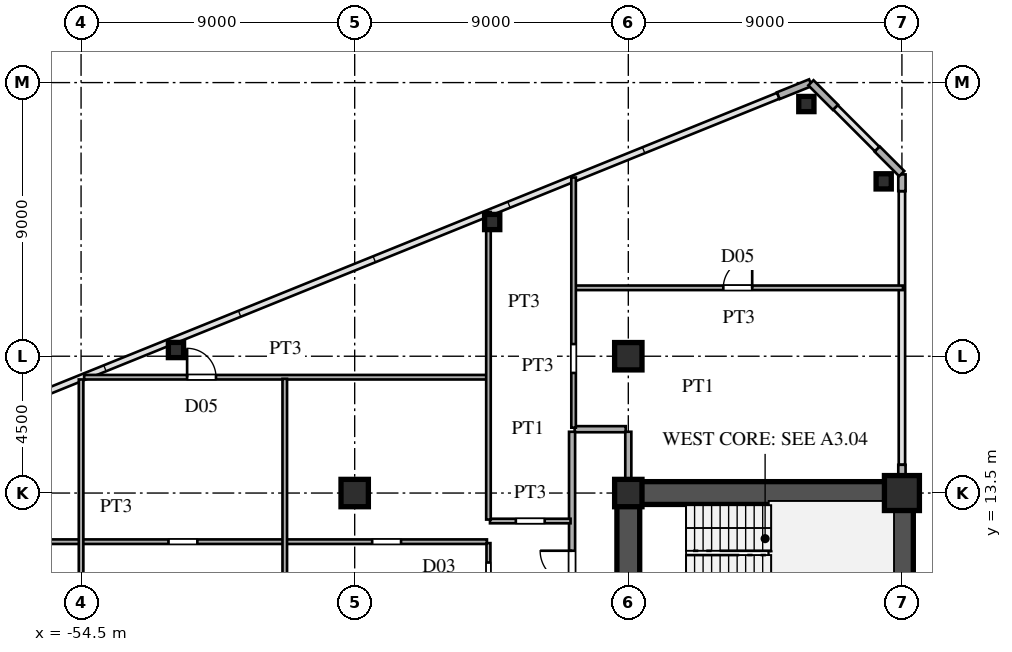
"""IFC4 building model, lengths in metres.
Left out: names, types, materials, properties, quantities, classifications, styles, units other than length and angle.
Written with IfcOpenShell. Run it as: python <this file> out.ifc"""

import sys

from ifc_helpers import new_model, si_unit, direction, frame, frame_2d, origin, origin_2d, place, context, subcontext, project, spatial, rectangle, hollow_rectangle, i_section, extrude, source, transform, mapped, element, fill, save


model = new_model("IFC4")
c1 = context("Model", 3, precision=1e-05, world=origin(), true_north=direction((0.0, 1.0)))
c2 = subcontext(c1, "Body", "Model", "MODEL_VIEW")
j1 = project(units=[si_unit("LENGTHUNIT", "METRE"), si_unit("PLANEANGLEUNIT", "RADIAN")], contexts=[c1])
p1 = place(None, origin())
s1 = spatial("IfcSite", under=j1, at=p1, CompositionType="ELEMENT")
p2 = place(p1, origin())
s2 = spatial("IfcBuilding", under=s1, at=p2, CompositionType="ELEMENT")
p3 = place(p2, frame((0.0, 0.0, 22.5)))
s3 = spatial("IfcBuildingStorey", under=s2, at=p3, CompositionType="ELEMENT", Elevation=22.5)
m1 = source(origin(), c2, "Body", "SweptSolid", [
    extrude(hollow_rectangle(XDim=1.15, YDim=1.15, WallThickness=0.048, at=origin_2d()), origin(), (0.0, 0.0, 1.0), 3.6),
])
p4 = place(p3, frame((-27.5, 13.5, 0.0), z_axis=(0.0, 0.0, 1.0), x_axis=(1.0, 0.0, 0.0)))
e1 = element("IfcColumn", 1, at=p4, inside=s3, PredefinedType="COLUMN", context=c2, shape_type="MappedRepresentation", body=[
    mapped(m1, transform((0.0, 0.0, 0.0), scale=1.0)),
])
m2 = source(origin(), c2, "Body", "SweptSolid", [
    extrude(i_section(OverallWidth=0.9, OverallDepth=0.9, WebThickness=0.036, FlangeThickness=0.055, at=origin_2d()), origin(), (0.0, 0.0, 1.0), 3.6),
])
for number, where, z_axis, x_axis in (
    (2, (-36.5, 13.5, 0.0), (0.0, 0.0, 1.0), (1.0, 0.0, 0.0)),
    (3, (-36.5, 18.0, 0.0), (0.0, 0.0, 1.0), (1.0, 0.0, 0.0)),
    (4, (-45.5, 13.5, 0.0), (0.0, 0.0, 1.0), (1.0, 0.0, 0.0)),
):
    element("IfcColumn", number, at=place(p3, frame(where, z_axis=z_axis, x_axis=x_axis)), inside=s3, PredefinedType="COLUMN", context=c2, shape_type="MappedRepresentation", body=[
        mapped(m2, transform((0.0, 0.0, 0.0), scale=1.0)),
    ])
m3 = source(origin(), c2, "Body", "SweptSolid", [
    extrude(hollow_rectangle(XDim=0.5, YDim=0.5, WallThickness=0.02, at=origin_2d()), origin(), (0.0, 0.0, 1.0), 3.6),
])
for number, where, z_axis, x_axis in (
    (5, (-28.1, 23.751, 0.0), (0.0, 0.0, 1.0), (1.0, 0.0, 0.0)),
    (6, (-30.643, 26.295, 0.0), (0.0, 0.0, 1.0), (1.0, 0.0, 0.0)),
    (7, (-40.977, 22.414, 0.0), (0.0, 0.0, 1.0), (1.0, 0.0, 0.0)),
    (8, (-51.378, 18.204, 0.0), (0.0, 0.0, 1.0), (1.0, 0.0, 0.0)),
):
    element("IfcColumn", number, at=place(p3, frame(where, z_axis=z_axis, x_axis=x_axis)), inside=s3, PredefinedType="COLUMN", context=c2, shape_type="MappedRepresentation", body=[
        mapped(m3, transform((0.0, 0.0, 0.0), scale=1.0)),
    ])
p5 = place(p3, frame((-27.5, 13.88, 0.0), z_axis=(0.0, 0.0, 1.0), x_axis=(0.0, 1.0, 0.0)))
e9 = element("IfcWall", 9, at=p5, inside=s3, PredefinedType="SOLIDWALL", context=c2, shape_type="SweptSolid", body=[
    extrude(rectangle(XDim=0.55, YDim=0.24, at=frame_2d((0.275, 0.0))), origin(), (0.0, 0.0, 1.0), 2.88),
])
p6 = place(p3, frame((-27.5, 23.43, 0.0), z_axis=(0.0, 0.0, 1.0), x_axis=(0.0, 1.0, 0.0)))
e10 = element("IfcWall", 10, at=p6, inside=s3, PredefinedType="SOLIDWALL", context=c2, shape_type="SweptSolid", body=[
    extrude(rectangle(XDim=0.55, YDim=0.24, at=frame_2d((0.275, 0.0))), origin(), (0.0, 0.0, 1.0), 3.38),
])
for number, where, z_axis, x_axis in (
    (11, (-27.507, 24.007, 0.0), (0.0, 0.0, 1.0), (-0.707, 0.707, 0.0)),
    (12, (-29.687, 26.187, 0.0), (0.0, 0.0, 1.0), (-0.707, 0.707, 0.0)),
):
    element("IfcWall", number, at=place(p3, frame(where, z_axis=z_axis, x_axis=x_axis)), inside=s3, PredefinedType="SOLIDWALL", context=c2, shape_type="SweptSolid", body=[
        extrude(rectangle(XDim=1.14, YDim=0.24, at=frame_2d((0.57, 0.0))), origin(), (0.0, 0.0, 1.0), 3.38),
    ])
p7 = place(p3, frame((-30.509, 26.996, 0.0), z_axis=(0.0, 0.0, 1.0), x_axis=(-0.927007103665, -0.375043770452, 0.0)))
e13 = element("IfcWall", 13, at=p7, inside=s3, PredefinedType="SOLIDWALL", context=c2, shape_type="SweptSolid", body=[
    extrude(rectangle(XDim=1.14, YDim=0.24, at=frame_2d((0.57, 0.0))), origin(), (0.0, 0.0, 1.0), 3.38),
])
p8 = place(p3, frame((-27.5, 1.3, 0.0), z_axis=(0.0, 0.0, 1.0), x_axis=(0.0, 1.0, 0.0)))
e14 = element("IfcWall", 14, at=p8, inside=s3, PredefinedType="SHEAR", context=c2, shape_type="SweptSolid", body=[
    extrude(rectangle(XDim=12.2, YDim=0.75, at=frame_2d((6.1, 0.0))), origin(), (0.0, 0.0, 1.0), 3.38),
])
p9 = place(p3, frame((-36.5, 13.5, 0.0), z_axis=(0.0, 0.0, 1.0), x_axis=(1.0, 0.0, 0.0)))
e15 = element("IfcWall", 15, at=p9, inside=s3, PredefinedType="SHEAR", context=c2, shape_type="SweptSolid", body=[
    extrude(rectangle(XDim=9.0, YDim=0.75, at=frame_2d((4.5, 0.0))), origin(), (0.0, 0.0, 1.0), 3.38),
])
p10 = place(p3, frame((-36.5, 8.2, 0.0), z_axis=(0.0, 0.0, 1.0), x_axis=(0.0, 1.0, 0.0)))
e16 = element("IfcWall", 16, at=p10, inside=s3, PredefinedType="SHEAR", context=c2, shape_type="SweptSolid", body=[
    extrude(rectangle(XDim=5.45, YDim=0.75, at=frame_2d((2.725, 0.0))), origin(), (0.0, 0.0, 1.0), 3.38),
])
p11 = place(p10, frame((0.245, 0.0, 0.0)))
e17 = element("IfcOpeningElement", 17, at=p11, cuts=e16, PredefinedType="OPENING", context=c2, shape_type="SweptSolid", body=[
    extrude(rectangle(XDim=0.95, YDim=2.15, at=frame_2d((0.475, 1.075))), frame((0.0, 0.385, 0.0), z_axis=(0.0, -1.0, 0.0), x_axis=(1.0, 0.0, 0.0)), (0.0, 0.0, 1.0), 0.77),
])
p12 = place(p3, frame((-67.833, 11.9, 0.0), z_axis=(0.0, 0.0, 1.0), x_axis=(1.0, 0.0, 0.0)))
e18 = element("IfcWall", 18, at=p12, inside=s3, PredefinedType="PARTITIONING", context=c2, shape_type="SweptSolid", body=[
    extrude(rectangle(XDim=26.683, YDim=0.15, at=frame_2d((13.342, 0.0))), origin(), (0.0, 0.0, 1.0), 3.38),
])
p13 = place(p12, frame((22.908, 0.0, 0.0)))
e19 = element("IfcOpeningElement", 19, at=p13, cuts=e18, PredefinedType="OPENING", context=c2, shape_type="SweptSolid", body=[
    extrude(rectangle(XDim=0.95, YDim=2.15, at=frame_2d((0.475, 1.075))), frame((0.0, 0.085, 0.0), z_axis=(0.0, -1.0, 0.0), x_axis=(1.0, 0.0, 0.0)), (0.0, 0.0, 1.0), 0.17),
])
p14 = place(p12, frame((3.359, 0.0, 0.0)))
e20 = element("IfcOpeningElement", 20, at=p14, cuts=e18, PredefinedType="OPENING", context=c2, shape_type="SweptSolid", body=[
    extrude(rectangle(XDim=0.95, YDim=2.15, at=frame_2d((0.475, 1.075))), frame((0.0, 0.085, 0.0), z_axis=(0.0, -1.0, 0.0), x_axis=(1.0, 0.0, 0.0)), (0.0, 0.0, 1.0), 0.17),
])
p15 = place(p12, frame((16.208, 0.0, 0.0)))
e21 = element("IfcOpeningElement", 21, at=p15, cuts=e18, PredefinedType="OPENING", context=c2, shape_type="SweptSolid", body=[
    extrude(rectangle(XDim=0.95, YDim=2.15, at=frame_2d((0.475, 1.075))), frame((0.0, 0.085, 0.0), z_axis=(0.0, -1.0, 0.0), x_axis=(1.0, 0.0, 0.0)), (0.0, 0.0, 1.0), 0.17),
])
p16 = place(p3, frame((-41.05, 12.58, 0.0), z_axis=(0.0, 0.0, 1.0), x_axis=(1.0, 0.0, 0.0)))
e22 = element("IfcWall", 22, at=p16, inside=s3, PredefinedType="PARTITIONING", context=c2, shape_type="SweptSolid", body=[
    extrude(rectangle(XDim=2.65, YDim=0.15, at=frame_2d((1.325, 0.0))), origin(), (0.0, 0.0, 1.0), 3.38),
])
p17 = place(p16, frame((0.85, 0.0, 0.0)))
e23 = element("IfcOpeningElement", 23, at=p17, cuts=e22, PredefinedType="OPENING", context=c2, shape_type="SweptSolid", body=[
    extrude(rectangle(XDim=0.95, YDim=2.15, at=frame_2d((0.475, 1.075))), frame((0.0, 0.085, 0.0), z_axis=(0.0, -1.0, 0.0), x_axis=(1.0, 0.0, 0.0)), (0.0, 0.0, 1.0), 0.17),
])
p18 = place(p3, frame((-38.265, 15.6, 0.0), z_axis=(0.0, 0.0, 1.0), x_axis=(1.0, 0.0, 0.0)))
e24 = element("IfcWall", 24, at=p18, inside=s3, PredefinedType="PARTITIONING", context=c2, shape_type="SweptSolid", body=[
    extrude(rectangle(XDim=1.68, YDim=0.2, at=frame_2d((0.84, 0.0))), origin(), (0.0, 0.0, 1.0), 3.38),
])
p19 = place(p3, frame((-54.399, 17.31, 0.0), z_axis=(0.0, 0.0, 1.0), x_axis=(1.0, 0.0, 0.0)))
e25 = element("IfcWall", 25, at=p19, inside=s3, PredefinedType="PARTITIONING", context=c2, shape_type="SweptSolid", body=[
    extrude(rectangle(XDim=13.249, YDim=0.15, at=frame_2d((6.625, 0.0))), origin(), (0.0, 0.0, 1.0), 3.38),
])
p20 = place(p19, frame((3.387, 0.0, 0.0)))
e26 = element("IfcOpeningElement", 26, at=p20, cuts=e25, PredefinedType="OPENING", context=c2, shape_type="SweptSolid", body=[
    extrude(rectangle(XDim=0.95, YDim=2.15, at=frame_2d((0.475, 1.075))), frame((0.0, 0.085, 0.0), z_axis=(0.0, -1.0, 0.0), x_axis=(1.0, 0.0, 0.0)), (0.0, 0.0, 1.0), 0.17),
])
p21 = place(p3, frame((-38.25, 20.25, 0.0), z_axis=(0.0, 0.0, 1.0), x_axis=(1.0, 0.0, 0.0)))
e27 = element("IfcWall", 27, at=p21, inside=s3, PredefinedType="PARTITIONING", context=c2, shape_type="SweptSolid", body=[
    extrude(rectangle(XDim=10.785, YDim=0.15, at=frame_2d((5.393, 0.0))), origin(), (0.0, 0.0, 1.0), 3.38),
])
p22 = place(p21, frame((4.875, 0.0, 0.0)))
e28 = element("IfcOpeningElement", 28, at=p22, cuts=e27, PredefinedType="OPENING", context=c2, shape_type="SweptSolid", body=[
    extrude(rectangle(XDim=0.95, YDim=2.15, at=frame_2d((0.475, 1.075))), frame((0.0, 0.085, 0.0), z_axis=(0.0, -1.0, 0.0), x_axis=(1.0, 0.0, 0.0)), (0.0, 0.0, 1.0), 0.17),
])
p23 = place(p3, frame((-54.5, -17.321, 0.0), z_axis=(0.0, 0.0, 1.0), x_axis=(0.0, 1.0, 0.0)))
e29 = element("IfcWall", 29, at=p23, inside=s3, PredefinedType="PARTITIONING", context=c2, shape_type="SweptSolid", body=[
    extrude(rectangle(XDim=34.557, YDim=0.15, at=frame_2d((17.279, 0.0))), origin(), (0.0, 0.0, 1.0), 2.68),
])
p24 = place(p23, frame((6.811, 0.0, 0.0)))
e30 = element("IfcOpeningElement", 30, at=p24, cuts=e29, PredefinedType="OPENING", context=c2, shape_type="SweptSolid", body=[
    extrude(rectangle(XDim=0.95, YDim=2.15, at=frame_2d((0.475, 1.075))), frame((0.0, 0.085, 0.0), z_axis=(0.0, -1.0, 0.0), x_axis=(1.0, 0.0, 0.0)), (0.0, 0.0, 1.0), 0.17),
])
p25 = place(p23, frame((16.346, 0.0, 0.0)))
e31 = element("IfcOpeningElement", 31, at=p25, cuts=e29, PredefinedType="OPENING", context=c2, shape_type="SweptSolid", body=[
    extrude(rectangle(XDim=0.95, YDim=2.15, at=frame_2d((0.475, 1.075))), frame((0.0, 0.085, 0.0), z_axis=(0.0, -1.0, 0.0), x_axis=(1.0, 0.0, 0.0)), (0.0, 0.0, 1.0), 0.17),
])
p26 = place(p23, frame((11.312, 0.0, 0.0)))
e32 = element("IfcOpeningElement", 32, at=p26, cuts=e29, PredefinedType="OPENING", context=c2, shape_type="SweptSolid", body=[
    extrude(rectangle(XDim=0.95, YDim=2.15, at=frame_2d((0.475, 1.075))), frame((0.0, 0.085, 0.0), z_axis=(0.0, -1.0, 0.0), x_axis=(1.0, 0.0, 0.0)), (0.0, 0.0, 1.0), 0.17),
])
p27 = place(p23, frame((20.352, 0.0, 0.0)))
e33 = element("IfcOpeningElement", 33, at=p27, cuts=e29, PredefinedType="OPENING", context=c2, shape_type="SweptSolid", body=[
    extrude(rectangle(XDim=0.95, YDim=2.15, at=frame_2d((0.475, 1.075))), frame((0.0, 0.085, 0.0), z_axis=(0.0, -1.0, 0.0), x_axis=(1.0, 0.0, 0.0)), (0.0, 0.0, 1.0), 0.17),
])
p28 = place(p23, frame((26.048, 0.0, 0.0)))
e34 = element("IfcOpeningElement", 34, at=p28, cuts=e29, PredefinedType="OPENING", context=c2, shape_type="SweptSolid", body=[
    extrude(rectangle(XDim=0.95, YDim=2.15, at=frame_2d((0.475, 1.075))), frame((0.0, 0.085, 0.0), z_axis=(0.0, -1.0, 0.0), x_axis=(1.0, 0.0, 0.0)), (0.0, 0.0, 1.0), 0.17),
])
p29 = place(p3, frame((-47.8, -17.59, 0.0), z_axis=(0.0, 0.0, 1.0), x_axis=(0.0, 1.0, 0.0)))
e35 = element("IfcWall", 35, at=p29, inside=s3, PredefinedType="PARTITIONING", context=c2, shape_type="SweptSolid", body=[
    extrude(rectangle(XDim=34.846, YDim=0.15, at=frame_2d((17.423, 0.0))), origin(), (0.0, 0.0, 1.0), 3.38),
])
p30 = place(p29, frame((7.08, 0.0, 0.0)))
e36 = element("IfcOpeningElement", 36, at=p30, cuts=e35, PredefinedType="OPENING", context=c2, shape_type="SweptSolid", body=[
    extrude(rectangle(XDim=0.95, YDim=2.15, at=frame_2d((0.475, 1.075))), frame((0.0, 0.085, 0.0), z_axis=(0.0, -1.0, 0.0), x_axis=(1.0, 0.0, 0.0)), (0.0, 0.0, 1.0), 0.17),
])
p31 = place(p29, frame((16.615, 0.0, 0.0)))
e37 = element("IfcOpeningElement", 37, at=p31, cuts=e35, PredefinedType="OPENING", context=c2, shape_type="SweptSolid", body=[
    extrude(rectangle(XDim=0.95, YDim=2.15, at=frame_2d((0.475, 1.075))), frame((0.0, 0.085, 0.0), z_axis=(0.0, -1.0, 0.0), x_axis=(1.0, 0.0, 0.0)), (0.0, 0.0, 1.0), 0.17),
])
p32 = place(p29, frame((26.317, 0.0, 0.0)))
e38 = element("IfcOpeningElement", 38, at=p32, cuts=e35, PredefinedType="OPENING", context=c2, shape_type="SweptSolid", body=[
    extrude(rectangle(XDim=0.95, YDim=2.15, at=frame_2d((0.475, 1.075))), frame((0.0, 0.085, 0.0), z_axis=(0.0, -1.0, 0.0), x_axis=(1.0, 0.0, 0.0)), (0.0, 0.0, 1.0), 0.17),
])
p33 = place(p3, frame((-41.1, 2.352, 0.0), z_axis=(0.0, 0.0, 1.0), x_axis=(0.0, 1.0, 0.0)))
e39 = element("IfcWall", 39, at=p33, inside=s3, PredefinedType="PARTITIONING", context=c2, shape_type="SweptSolid", body=[
    extrude(rectangle(XDim=9.501, YDim=0.13, at=frame_2d((4.75, 0.0))), origin(), (0.0, 0.0, 1.0), 3.38),
])
p34 = place(p33, frame((7.913, 0.0, 0.0)))
e40 = element("IfcOpeningElement", 40, at=p34, cuts=e39, PredefinedType="OPENING", context=c2, shape_type="SweptSolid", body=[
    extrude(rectangle(XDim=0.95, YDim=2.15, at=frame_2d((0.475, 1.075))), frame((0.0, 0.075, 0.0), z_axis=(0.0, -1.0, 0.0), x_axis=(1.0, 0.0, 0.0)), (0.0, 0.0, 1.0), 0.15),
])
p35 = place(p3, frame((-41.1, 12.628, 0.0), z_axis=(0.0, 0.0, 1.0), x_axis=(0.0, 1.0, 0.0)))
e41 = element("IfcWall", 41, at=p35, inside=s3, PredefinedType="PARTITIONING", context=c2, shape_type="SweptSolid", body=[
    extrude(rectangle(XDim=10.116, YDim=0.15, at=frame_2d((5.058, 0.0))), origin(), (0.0, 0.0, 1.0), 2.99),
])
p36 = place(p3, frame((-38.35, -15.515, 0.0), z_axis=(0.0, 0.0, 1.0), x_axis=(0.0, 1.0, 0.0)))
e42 = element("IfcWall", 42, at=p36, inside=s3, PredefinedType="PARTITIONING", context=c2, shape_type="SweptSolid", body=[
    extrude(rectangle(XDim=31.03, YDim=0.2, at=frame_2d((15.515, 0.0))), origin(), (0.0, 0.0, 1.0), 3.38),
])
p37 = place(p36, frame((3.345, 0.0, 0.0)))
e43 = element("IfcOpeningElement", 43, at=p37, cuts=e42, PredefinedType="OPENING", context=c2, shape_type="SweptSolid", body=[
    extrude(rectangle(XDim=1.05, YDim=2.25, at=frame_2d((0.525, 1.125))), frame((0.0, 0.11, 0.0), z_axis=(0.0, -1.0, 0.0), x_axis=(1.0, 0.0, 0.0)), (0.0, 0.0, 1.0), 0.22),
])
p38 = place(p36, frame((14.28, 0.0, 0.0)))
e44 = element("IfcOpeningElement", 44, at=p38, cuts=e42, PredefinedType="OPENING", context=c2, shape_type="SweptSolid", body=[
    extrude(rectangle(XDim=1.05, YDim=2.25, at=frame_2d((0.525, 1.125))), frame((0.0, 0.11, 0.0), z_axis=(0.0, -1.0, 0.0), x_axis=(1.0, 0.0, 0.0)), (0.0, 0.0, 1.0), 0.22),
])
p39 = place(p36, frame((26.067, 0.0, 0.0)))
e45 = element("IfcOpeningElement", 45, at=p39, cuts=e42, PredefinedType="OPENING", context=c2, shape_type="SweptSolid", body=[
    extrude(rectangle(XDim=1.05, YDim=2.25, at=frame_2d((0.525, 1.125))), frame((0.0, 0.11, 0.0), z_axis=(0.0, -1.0, 0.0), x_axis=(1.0, 0.0, 0.0)), (0.0, 0.0, 1.0), 0.22),
])
p40 = place(p3, frame((-38.3, 15.65, 0.0), z_axis=(0.0, 0.0, 1.0), x_axis=(0.0, 1.0, 0.0)))
e46 = element("IfcWall", 46, at=p40, inside=s3, PredefinedType="PARTITIONING", context=c2, shape_type="SweptSolid", body=[
    extrude(rectangle(XDim=8.228, YDim=0.15, at=frame_2d((4.114, 0.0))), origin(), (0.0, 0.0, 1.0), 3.38),
])
p41 = place(p40, frame((1.8, 0.0, 0.0)))
e47 = element("IfcOpeningElement", 47, at=p41, cuts=e46, PredefinedType="OPENING", context=c2, shape_type="SweptSolid", body=[
    extrude(rectangle(XDim=0.95, YDim=2.15, at=frame_2d((0.475, 1.075))), frame((0.0, 0.085, 0.0), z_axis=(0.0, -1.0, 0.0), x_axis=(1.0, 0.0, 0.0)), (0.0, 0.0, 1.0), 0.17),
])
p42 = place(p3, frame((-36.5, 13.88, 0.0), z_axis=(0.0, 0.0, 1.0), x_axis=(0.0, 1.0, 0.0)))
e48 = element("IfcWall", 48, at=p42, inside=s3, PredefinedType="PARTITIONING", context=c2, shape_type="SweptSolid", body=[
    extrude(rectangle(XDim=1.635, YDim=0.2, at=frame_2d((0.817, 0.0))), origin(), (0.0, 0.0, 1.0), 2.68),
])
m4 = source(origin(), c2, "Body", "SweptSolid", [
    extrude(rectangle(XDim=0.95, YDim=2.15, at=frame_2d((0.475, 1.075))), frame((0.0, 0.025, 0.0), z_axis=(0.0, -1.0, 0.0), x_axis=(1.0, 0.0, 0.0)), (0.0, 0.0, 1.0), 0.05),
])
p43 = place(p20, origin())
e49 = element("IfcDoor", 49, at=p43, inside=s3, OperationType="SINGLE_SWING_LEFT", PredefinedType="DOOR", context=c2, shape_type="MappedRepresentation", body=[
    mapped(m4, transform((0.0, 0.0, 0.0), scale=1.0)),
])
fill(e26, e49)
p44 = place(p22, origin())
e50 = element("IfcDoor", 50, at=p44, inside=s3, OperationType="SINGLE_SWING_RIGHT", PredefinedType="DOOR", context=c2, shape_type="MappedRepresentation", body=[
    mapped(m4, transform((0.0, 0.0, 0.0), scale=1.0)),
])
fill(e28, e50)
m5 = source(origin(), c2, "Body", "SweptSolid", [
    extrude(rectangle(XDim=1.05, YDim=2.25, at=frame_2d((0.525, 1.125))), frame((0.0, 0.025, 0.0), z_axis=(0.0, -1.0, 0.0), x_axis=(1.0, 0.0, 0.0)), (0.0, 0.0, 1.0), 0.05),
])
p45 = place(p39, origin())
e51 = element("IfcDoor", 51, at=p45, inside=s3, OperationType="SINGLE_SWING_RIGHT", PredefinedType="DOOR", context=c2, shape_type="MappedRepresentation", body=[
    mapped(m5, transform((0.0, 0.0, 0.0), scale=1.0)),
])
fill(e45, e51)
save(model, sys.argv[1])
